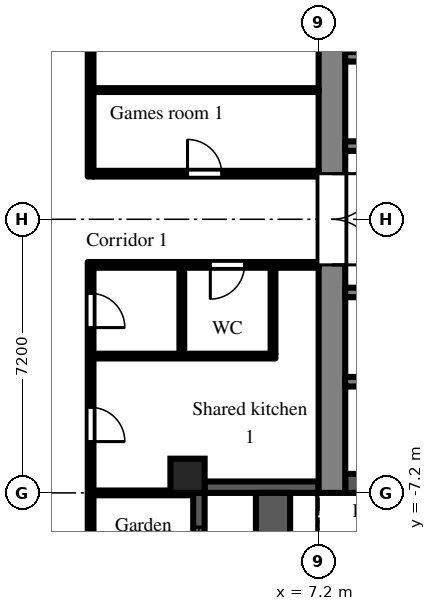
"""IFC4 building model, lengths in metres.
Left out: names, types, materials, properties, quantities, classifications, styles, units other than length and angle.
Written with IfcOpenShell. Run it as: python <this file> out.ifc"""

import sys

from ifc_helpers import new_model, si_unit, direction, frame, frame_2d, origin, origin_2d, place, context, subcontext, project, spatial, rectangle, extrude, element, fill, save


model = new_model("IFC4")
c1 = context("Model", 3, precision=1e-05, world=origin(), true_north=direction((0.0, 1.0)))
c2 = subcontext(c1, "Body", "Model", "MODEL_VIEW")
j1 = project(units=[si_unit("LENGTHUNIT", "METRE"), si_unit("PLANEANGLEUNIT", "RADIAN")], contexts=[c1])
p1 = place(None, origin())
s1 = spatial("IfcSite", under=j1, at=p1, CompositionType="ELEMENT")
p2 = place(p1, origin())
s2 = spatial("IfcBuilding", under=s1, at=p2, CompositionType="ELEMENT")
p3 = place(p2, frame((0.0, 0.0, 102.9)))
s3 = spatial("IfcBuildingStorey", under=s2, at=p3, CompositionType="ELEMENT", Elevation=102.9)
p4 = place(p3, frame((3.75, -6.75, 0.0), z_axis=(0.0, 0.0, 1.0), x_axis=(1.0, 0.0, 0.0)))
e1 = element("IfcColumn", 1, at=p4, inside=s3, PredefinedType="COLUMN", context=c2, shape_type="SweptSolid", body=[
    extrude(rectangle(XDim=0.9, YDim=0.9, at=origin_2d()), origin(), (0.0, 0.0, 1.0), 3.0),
])
p5 = place(p3, frame((4.05, -14.4, 0.0), z_axis=(0.0, 0.0, 1.0), x_axis=(0.0, 1.0, 0.0)))
e2 = element("IfcWall", 2, at=p5, inside=s3, PredefinedType="SOLIDWALL", context=c2, shape_type="SweptSolid", body=[
    extrude(rectangle(XDim=7.2, YDim=0.3, at=frame_2d((3.6, 0.0))), origin(), (0.0, 0.0, 1.0), 2.1),
])
p6 = place(p5, frame((3.0, 0.0, 0.0)))
e3 = element("IfcOpeningElement", 3, at=p6, cuts=e2, PredefinedType="OPENING", context=c2, shape_type="SweptSolid", body=[
    extrude(rectangle(XDim=1.2, YDim=2.05, at=frame_2d((0.6, 1.025))), frame((0.0, 0.16, 0.0), z_axis=(0.0, -1.0, 0.0), x_axis=(1.0, 0.0, 0.0)), (0.0, 0.0, 1.0), 0.32),
])
p7 = place(p5, frame((0.9, 0.0, 0.2)))
e4 = element("IfcOpeningElement", 4, at=p7, cuts=e2, PredefinedType="OPENING", context=c2, shape_type="SweptSolid", body=[
    extrude(rectangle(XDim=1.8, YDim=1.85, at=frame_2d((0.9, 0.925))), frame((0.0, 0.16, 0.0), z_axis=(0.0, -1.0, 0.0), x_axis=(1.0, 0.0, 0.0)), (0.0, 0.0, 1.0), 0.32),
])
p8 = place(p5, frame((4.5, 0.0, 0.2)))
e5 = element("IfcOpeningElement", 5, at=p8, cuts=e2, PredefinedType="OPENING", context=c2, shape_type="SweptSolid", body=[
    extrude(rectangle(XDim=1.8, YDim=1.85, at=frame_2d((0.9, 0.925))), frame((0.0, 0.16, 0.0), z_axis=(0.0, -1.0, 0.0), x_axis=(1.0, 0.0, 0.0)), (0.0, 0.0, 1.0), 0.32),
])
p9 = place(p3, frame((4.2, -7.05, 0.0), z_axis=(0.0, 0.0, 1.0), x_axis=(1.0, 0.0, 0.0)))
e6 = element("IfcWall", 6, at=p9, inside=s3, PredefinedType="SOLIDWALL", context=c2, shape_type="SweptSolid", body=[
    extrude(rectangle(XDim=3.0, YDim=0.3, at=frame_2d((1.5, 0.0))), origin(), (0.0, 0.0, 1.0), 2.1),
])
p10 = place(p3, frame((6.0, -14.4, 0.0), z_axis=(0.0, 0.0, 1.0), x_axis=(0.0, 1.0, 0.0)))
e7 = element("IfcWall", 7, at=p10, inside=s3, PredefinedType="PARAPET", context=c2, shape_type="SweptSolid", body=[
    extrude(rectangle(XDim=7.2, YDim=0.9, at=frame_2d((3.6, 0.0))), origin(), (0.0, 0.0, 1.0), 0.8),
])
p11 = place(p3, frame((7.55, -7.2, 0.0), z_axis=(0.0, 0.0, 1.0), x_axis=(0.0, 1.0, 0.0)))
e8 = element("IfcWall", 8, at=p11, inside=s3, PredefinedType="SHEAR", context=c2, shape_type="SweptSolid", body=[
    extrude(rectangle(XDim=14.4, YDim=0.7, at=frame_2d((7.2, 0.0))), origin(), (0.0, 0.0, 1.0), 2.575),
])
p12 = place(p11, frame((6.0, 0.0, 0.0)))
e9 = element("IfcOpeningElement", 9, at=p12, cuts=e8, PredefinedType="OPENING", context=c2, shape_type="SweptSolid", body=[
    extrude(rectangle(XDim=2.4, YDim=2.2, at=frame_2d((1.2, 1.1))), frame((0.0, 0.36, 0.0), z_axis=(0.0, -1.0, 0.0), x_axis=(1.0, 0.0, 0.0)), (0.0, 0.0, 1.0), 0.72),
])
p13 = place(p3, frame((7.9, 1.925, 0.0), z_axis=(0.0, 0.0, 1.0), x_axis=(1.0, 0.0, 0.0)))
e10 = element("IfcWall", 10, at=p13, inside=s3, PredefinedType="SHEAR", context=c2, shape_type="SweptSolid", body=[
    extrude(rectangle(XDim=12.95, YDim=0.25, at=frame_2d((6.475, 0.0))), origin(), (0.0, 0.0, 1.0), 2.575),
])
p14 = place(p13, frame((0.525, 0.0, 0.0)))
e11 = element("IfcOpeningElement", 11, at=p14, cuts=e10, PredefinedType="OPENING", context=c2, shape_type="SweptSolid", body=[
    extrude(rectangle(XDim=0.9, YDim=2.1, at=frame_2d((0.45, 1.05))), frame((0.0, 0.135, 0.0), z_axis=(0.0, -1.0, 0.0), x_axis=(1.0, 0.0, 0.0)), (0.0, 0.0, 1.0), 0.27),
])
p15 = place(p13, frame((2.625, 0.0, 0.0)))
e12 = element("IfcOpeningElement", 12, at=p15, cuts=e10, PredefinedType="OPENING", context=c2, shape_type="SweptSolid", body=[
    extrude(rectangle(XDim=1.1, YDim=2.1, at=frame_2d((0.55, 1.05))), frame((0.0, 0.135, 0.0), z_axis=(0.0, -1.0, 0.0), x_axis=(1.0, 0.0, 0.0)), (0.0, 0.0, 1.0), 0.27),
])
p16 = place(p13, frame((4.925, 0.0, 0.0)))
e13 = element("IfcOpeningElement", 13, at=p16, cuts=e10, PredefinedType="OPENING", context=c2, shape_type="SweptSolid", body=[
    extrude(rectangle(XDim=0.9, YDim=2.1, at=frame_2d((0.45, 1.05))), frame((0.0, 0.135, 0.0), z_axis=(0.0, -1.0, 0.0), x_axis=(1.0, 0.0, 0.0)), (0.0, 0.0, 1.0), 0.27),
])
p17 = place(p13, frame((8.225, 0.0, 0.0)))
e14 = element("IfcOpeningElement", 14, at=p17, cuts=e10, PredefinedType="OPENING", context=c2, shape_type="SweptSolid", body=[
    extrude(rectangle(XDim=0.9, YDim=2.1, at=frame_2d((0.45, 1.05))), frame((0.0, 0.135, 0.0), z_axis=(0.0, -1.0, 0.0), x_axis=(1.0, 0.0, 0.0)), (0.0, 0.0, 1.0), 0.27),
])
p18 = place(p3, frame((7.9, 4.275, 0.0), z_axis=(0.0, 0.0, 1.0), x_axis=(1.0, 0.0, 0.0)))
e15 = element("IfcWall", 15, at=p18, inside=s3, PredefinedType="SHEAR", context=c2, shape_type="SweptSolid", body=[
    extrude(rectangle(XDim=1.95, YDim=0.25, at=frame_2d((0.975, 0.0))), origin(), (0.0, 0.0, 1.0), 2.575),
])
p19 = place(p3, frame((7.9, -6.95, 0.0), z_axis=(0.0, 0.0, 1.0), x_axis=(1.0, 0.0, 0.0)))
e16 = element("IfcWall", 16, at=p19, inside=s3, PredefinedType="SHEAR", context=c2, shape_type="SweptSolid", body=[
    extrude(rectangle(XDim=12.95, YDim=0.5, at=frame_2d((6.475, 0.0))), origin(), (0.0, 0.0, 1.0), 2.575),
])
p20 = place(p3, frame((7.9, -1.925, 0.0), z_axis=(0.0, 0.0, 1.0), x_axis=(1.0, 0.0, 0.0)))
e17 = element("IfcWall", 17, at=p20, inside=s3, PredefinedType="SHEAR", context=c2, shape_type="SweptSolid", body=[
    extrude(rectangle(XDim=12.95, YDim=0.25, at=frame_2d((6.475, 0.0))), origin(), (0.0, 0.0, 1.0), 2.575),
])
p21 = place(p20, frame((4.825, 0.0, 0.0)))
e18 = element("IfcOpeningElement", 18, at=p21, cuts=e17, PredefinedType="OPENING", context=c2, shape_type="SweptSolid", body=[
    extrude(rectangle(XDim=1.1, YDim=2.1, at=frame_2d((0.55, 1.05))), frame((0.0, 0.135, 0.0), z_axis=(0.0, -1.0, 0.0), x_axis=(1.0, 0.0, 0.0)), (0.0, 0.0, 1.0), 0.27),
])
p22 = place(p20, frame((7.025, 0.0, 0.0)))
e19 = element("IfcOpeningElement", 19, at=p22, cuts=e17, PredefinedType="OPENING", context=c2, shape_type="SweptSolid", body=[
    extrude(rectangle(XDim=1.1, YDim=2.1, at=frame_2d((0.55, 1.05))), frame((0.0, 0.135, 0.0), z_axis=(0.0, -1.0, 0.0), x_axis=(1.0, 0.0, 0.0)), (0.0, 0.0, 1.0), 0.27),
])
p23 = place(p20, frame((9.225, 0.0, 0.0)))
e20 = element("IfcOpeningElement", 20, at=p23, cuts=e17, PredefinedType="OPENING", context=c2, shape_type="SweptSolid", body=[
    extrude(rectangle(XDim=1.1, YDim=2.1, at=frame_2d((0.55, 1.05))), frame((0.0, 0.135, 0.0), z_axis=(0.0, -1.0, 0.0), x_axis=(1.0, 0.0, 0.0)), (0.0, 0.0, 1.0), 0.27),
])
p24 = place(p20, frame((0.525, 0.0, 0.0)))
e21 = element("IfcOpeningElement", 21, at=p24, cuts=e17, PredefinedType="OPENING", context=c2, shape_type="SweptSolid", body=[
    extrude(rectangle(XDim=0.9, YDim=2.1, at=frame_2d((0.45, 1.05))), frame((0.0, 0.135, 0.0), z_axis=(0.0, -1.0, 0.0), x_axis=(1.0, 0.0, 0.0)), (0.0, 0.0, 1.0), 0.27),
])
p25 = place(p20, frame((2.625, 0.0, 0.0)))
e22 = element("IfcOpeningElement", 22, at=p25, cuts=e17, PredefinedType="OPENING", context=c2, shape_type="SweptSolid", body=[
    extrude(rectangle(XDim=1.1, YDim=2.1, at=frame_2d((0.55, 1.05))), frame((0.0, 0.135, 0.0), z_axis=(0.0, -1.0, 0.0), x_axis=(1.0, 0.0, 0.0)), (0.0, 0.0, 1.0), 0.27),
])
p26 = place(p3, frame((7.9, -4.275, 0.0), z_axis=(0.0, 0.0, 1.0), x_axis=(1.0, 0.0, 0.0)))
e23 = element("IfcWall", 23, at=p26, inside=s3, PredefinedType="SHEAR", context=c2, shape_type="SweptSolid", body=[
    extrude(rectangle(XDim=1.95, YDim=0.25, at=frame_2d((0.975, 0.0))), origin(), (0.0, 0.0, 1.0), 2.575),
])
p27 = place(p3, frame((1.2, -36.5, 0.0), z_axis=(0.0, 0.0, 1.0), x_axis=(0.0, 1.0, 0.0)))
e24 = element("IfcWall", 24, at=p27, inside=s3, PredefinedType="PARTITIONING", context=c2, shape_type="SweptSolid", body=[
    extrude(rectangle(XDim=35.375, YDim=0.15, at=frame_2d((17.688, 0.0))), origin(), (0.0, 0.0, 1.0), 2.575),
])
p28 = place(p27, frame((33.65, 0.0, 0.0)))
e25 = element("IfcOpeningElement", 25, at=p28, cuts=e24, PredefinedType="OPENING", context=c2, shape_type="SweptSolid", body=[
    extrude(rectangle(XDim=0.9, YDim=2.1, at=frame_2d((0.45, 1.05))), frame((0.0, 0.085, 0.0), z_axis=(0.0, -1.0, 0.0), x_axis=(1.0, 0.0, 0.0)), (0.0, 0.0, 1.0), 0.17),
])
p29 = place(p27, frame((30.65, 0.0, 0.0)))
e26 = element("IfcOpeningElement", 26, at=p29, cuts=e24, PredefinedType="OPENING", context=c2, shape_type="SweptSolid", body=[
    extrude(rectangle(XDim=0.9, YDim=2.1, at=frame_2d((0.45, 1.05))), frame((0.0, 0.085, 0.0), z_axis=(0.0, -1.0, 0.0), x_axis=(1.0, 0.0, 0.0)), (0.0, 0.0, 1.0), 0.17),
])
p30 = place(p27, frame((23.45, 0.0, 0.0)))
e27 = element("IfcOpeningElement", 27, at=p30, cuts=e24, PredefinedType="OPENING", context=c2, shape_type="SweptSolid", body=[
    extrude(rectangle(XDim=0.9, YDim=2.1, at=frame_2d((0.45, 1.05))), frame((0.0, 0.085, 0.0), z_axis=(0.0, -1.0, 0.0), x_axis=(1.0, 0.0, 0.0)), (0.0, 0.0, 1.0), 0.17),
])
p31 = place(p27, frame((20.75, 0.0, 0.0)))
e28 = element("IfcOpeningElement", 28, at=p31, cuts=e24, PredefinedType="OPENING", context=c2, shape_type="SweptSolid", body=[
    extrude(rectangle(XDim=0.9, YDim=2.1, at=frame_2d((0.45, 1.05))), frame((0.0, 0.085, 0.0), z_axis=(0.0, -1.0, 0.0), x_axis=(1.0, 0.0, 0.0)), (0.0, 0.0, 1.0), 0.17),
])
p32 = place(p27, frame((18.95, 0.0, 0.0)))
e29 = element("IfcOpeningElement", 29, at=p32, cuts=e24, PredefinedType="OPENING", context=c2, shape_type="SweptSolid", body=[
    extrude(rectangle(XDim=0.9, YDim=2.1, at=frame_2d((0.45, 1.05))), frame((0.0, 0.085, 0.0), z_axis=(0.0, -1.0, 0.0), x_axis=(1.0, 0.0, 0.0)), (0.0, 0.0, 1.0), 0.17),
])
p33 = place(p27, frame((1.55, 0.0, 0.0)))
e30 = element("IfcOpeningElement", 30, at=p33, cuts=e24, PredefinedType="OPENING", context=c2, shape_type="SweptSolid", body=[
    extrude(rectangle(XDim=1.0, YDim=2.1, at=frame_2d((0.5, 1.05))), frame((0.0, 0.085, 0.0), z_axis=(0.0, -1.0, 0.0), x_axis=(1.0, 0.0, 0.0)), (0.0, 0.0, 1.0), 0.17),
])
p34 = place(p3, frame((1.275, -7.2, 0.0), z_axis=(0.0, 0.0, 1.0), x_axis=(1.0, 0.0, 0.0)))
e31 = element("IfcWall", 31, at=p34, inside=s3, PredefinedType="PARTITIONING", context=c2, shape_type="SweptSolid", body=[
    extrude(rectangle(XDim=2.625, YDim=0.125, at=frame_2d((1.312, 0.0))), origin(), (0.0, 0.0, 1.0), 2.575),
])
p35 = place(p3, frame((1.275, -3.6, 0.0), z_axis=(0.0, 0.0, 1.0), x_axis=(1.0, 0.0, 0.0)))
e32 = element("IfcWall", 32, at=p35, inside=s3, PredefinedType="PARTITIONING", context=c2, shape_type="SweptSolid", body=[
    extrude(rectangle(XDim=4.788, YDim=0.125, at=frame_2d((2.394, 0.0))), origin(), (0.0, 0.0, 1.0), 2.575),
])
p36 = place(p3, frame((1.275, -1.2, 0.0), z_axis=(0.0, 0.0, 1.0), x_axis=(1.0, 0.0, 0.0)))
e33 = element("IfcWall", 33, at=p36, inside=s3, PredefinedType="PARTITIONING", context=c2, shape_type="SweptSolid", body=[
    extrude(rectangle(XDim=5.925, YDim=0.15, at=frame_2d((2.962, 0.0))), origin(), (0.0, 0.0, 1.0), 2.575),
])
p37 = place(p36, frame((3.075, 0.0, 0.0)))
e34 = element("IfcOpeningElement", 34, at=p37, cuts=e33, PredefinedType="OPENING", context=c2, shape_type="SweptSolid", body=[
    extrude(rectangle(XDim=0.9, YDim=2.1, at=frame_2d((0.45, 1.05))), frame((0.0, 0.085, 0.0), z_axis=(0.0, -1.0, 0.0), x_axis=(1.0, 0.0, 0.0)), (0.0, 0.0, 1.0), 0.17),
])
p38 = place(p3, frame((1.2, 1.125, 0.0), z_axis=(0.0, 0.0, 1.0), x_axis=(0.0, 1.0, 0.0)))
e35 = element("IfcWall", 35, at=p38, inside=s3, PredefinedType="PARTITIONING", context=c2, shape_type="SweptSolid", body=[
    extrude(rectangle(XDim=16.8, YDim=0.15, at=frame_2d((8.4, 0.0))), origin(), (0.0, 0.0, 1.0), 2.575),
])
p39 = place(p38, frame((3.725, 0.0, 0.0)))
e36 = element("IfcOpeningElement", 36, at=p39, cuts=e35, PredefinedType="OPENING", context=c2, shape_type="SweptSolid", body=[
    extrude(rectangle(XDim=0.9, YDim=2.1, at=frame_2d((0.45, 1.05))), frame((0.0, 0.085, 0.0), z_axis=(0.0, -1.0, 0.0), x_axis=(1.0, 0.0, 0.0)), (0.0, 0.0, 1.0), 0.17),
])
p40 = place(p38, frame((11.425, 0.0, 0.0)))
e37 = element("IfcOpeningElement", 37, at=p40, cuts=e35, PredefinedType="OPENING", context=c2, shape_type="SweptSolid", body=[
    extrude(rectangle(XDim=0.9, YDim=2.1, at=frame_2d((0.45, 1.05))), frame((0.0, 0.085, 0.0), z_axis=(0.0, -1.0, 0.0), x_axis=(1.0, 0.0, 0.0)), (0.0, 0.0, 1.0), 0.17),
])
p41 = place(p38, frame((7.825, 0.0, 0.0)))
e38 = element("IfcOpeningElement", 38, at=p41, cuts=e35, PredefinedType="OPENING", context=c2, shape_type="SweptSolid", body=[
    extrude(rectangle(XDim=0.9, YDim=2.1, at=frame_2d((0.45, 1.05))), frame((0.0, 0.085, 0.0), z_axis=(0.0, -1.0, 0.0), x_axis=(1.0, 0.0, 0.0)), (0.0, 0.0, 1.0), 0.17),
])
p42 = place(p38, frame((13.475, 0.0, 0.0)))
e39 = element("IfcOpeningElement", 39, at=p42, cuts=e35, PredefinedType="OPENING", context=c2, shape_type="SweptSolid", body=[
    extrude(rectangle(XDim=1.0, YDim=2.1, at=frame_2d((0.5, 1.05))), frame((0.0, 0.085, 0.0), z_axis=(0.0, -1.0, 0.0), x_axis=(1.0, 0.0, 0.0)), (0.0, 0.0, 1.0), 0.17),
])
p43 = place(p3, frame((1.275, 1.2, 0.0), z_axis=(0.0, 0.0, 1.0), x_axis=(1.0, 0.0, 0.0)))
e40 = element("IfcWall", 40, at=p43, inside=s3, PredefinedType="PARTITIONING", context=c2, shape_type="SweptSolid", body=[
    extrude(rectangle(XDim=5.925, YDim=0.15, at=frame_2d((2.962, 0.0))), origin(), (0.0, 0.0, 1.0), 2.575),
])
p44 = place(p43, frame((2.475, 0.0, 0.0)))
e41 = element("IfcOpeningElement", 41, at=p44, cuts=e40, PredefinedType="OPENING", context=c2, shape_type="SweptSolid", body=[
    extrude(rectangle(XDim=0.9, YDim=2.1, at=frame_2d((0.45, 1.05))), frame((0.0, 0.085, 0.0), z_axis=(0.0, -1.0, 0.0), x_axis=(1.0, 0.0, 0.0)), (0.0, 0.0, 1.0), 0.17),
])
p45 = place(p3, frame((1.275, 3.4, 0.0), z_axis=(0.0, 0.0, 1.0), x_axis=(1.0, 0.0, 0.0)))
e42 = element("IfcWall", 42, at=p45, inside=s3, PredefinedType="PARTITIONING", context=c2, shape_type="SweptSolid", body=[
    extrude(rectangle(XDim=5.925, YDim=0.1, at=frame_2d((2.962, 0.0))), origin(), (0.0, 0.0, 1.0), 2.575),
])
for number, where, z_axis, x_axis in (
    (43, (3.6, -3.538, 0.0), (0.0, 0.0, 1.0), (0.0, 1.0, 0.0)),
    (44, (6.0, -3.538, 0.0), (0.0, 0.0, 1.0), (0.0, 1.0, 0.0)),
):
    element("IfcWall", number, at=place(p3, frame(where, z_axis=z_axis, x_axis=x_axis)), inside=s3, PredefinedType="PARTITIONING", context=c2, shape_type="SweptSolid", body=[
        extrude(rectangle(XDim=2.263, YDim=0.125, at=frame_2d((1.131, 0.0))), origin(), (0.0, 0.0, 1.0), 2.575),
    ])
p46 = place(p8, origin())
e45 = element("IfcWindow", 45, at=p46, inside=s3, PartitioningType="SINGLE_PANEL", PredefinedType="WINDOW", context=c2, shape_type="SweptSolid", body=[
    extrude(rectangle(XDim=1.8, YDim=1.85, at=frame_2d((0.9, 0.925))), frame((0.0, 0.03, 0.0), z_axis=(0.0, -1.0, 0.0), x_axis=(1.0, 0.0, 0.0)), (0.0, 0.0, 1.0), 0.06),
])
fill(e5, e45)
p47 = place(p12, frame((2.4, 0.0, 0.0), z_axis=(0.0, 0.0, 1.0), x_axis=(-1.0, 0.0, 0.0)))
e46 = element("IfcDoor", 46, at=p47, inside=s3, OperationType="DOUBLE_DOOR_DOUBLE_SWING", PredefinedType="DOOR", context=c2, shape_type="SweptSolid", body=[
    extrude(rectangle(XDim=2.4, YDim=2.2, at=frame_2d((1.2, 1.1))), frame((0.0, 0.025, 0.0), z_axis=(0.0, -1.0, 0.0), x_axis=(1.0, 0.0, 0.0)), (0.0, 0.0, 1.0), 0.05),
])
fill(e9, e46)
p48 = place(p44, origin())
e47 = element("IfcDoor", 47, at=p48, inside=s3, OperationType="SINGLE_SWING_LEFT", PredefinedType="DOOR", context=c2, shape_type="SweptSolid", body=[
    extrude(rectangle(XDim=0.9, YDim=2.1, at=frame_2d((0.45, 1.05))), frame((0.0, 0.025, 0.0), z_axis=(0.0, -1.0, 0.0), x_axis=(1.0, 0.0, 0.0)), (0.0, 0.0, 1.0), 0.05),
])
fill(e41, e47)
p49 = place(p28, frame((0.9, 0.0, 0.0), z_axis=(0.0, 0.0, 1.0), x_axis=(-1.0, 0.0, 0.0)))
e48 = element("IfcDoor", 48, at=p49, inside=s3, OperationType="SINGLE_SWING_RIGHT", PredefinedType="DOOR", context=c2, shape_type="SweptSolid", body=[
    extrude(rectangle(XDim=0.9, YDim=2.1, at=frame_2d((0.45, 1.05))), frame((0.0, 0.025, 0.0), z_axis=(0.0, -1.0, 0.0), x_axis=(1.0, 0.0, 0.0)), (0.0, 0.0, 1.0), 0.05),
])
fill(e25, e48)
p50 = place(p37, frame((0.9, 0.0, 0.0), z_axis=(0.0, 0.0, 1.0), x_axis=(-1.0, 0.0, 0.0)))
e49 = element("IfcDoor", 49, at=p50, inside=s3, OperationType="SINGLE_SWING_RIGHT", PredefinedType="DOOR", context=c2, shape_type="SweptSolid", body=[
    extrude(rectangle(XDim=0.9, YDim=2.1, at=frame_2d((0.45, 1.05))), frame((0.0, 0.025, 0.0), z_axis=(0.0, -1.0, 0.0), x_axis=(1.0, 0.0, 0.0)), (0.0, 0.0, 1.0), 0.05),
])
fill(e34, e49)
p51 = place(p29, frame((0.9, 0.0, 0.0), z_axis=(0.0, 0.0, 1.0), x_axis=(-1.0, 0.0, 0.0)))
e50 = element("IfcDoor", 50, at=p51, inside=s3, OperationType="SINGLE_SWING_RIGHT", PredefinedType="DOOR", context=c2, shape_type="SweptSolid", body=[
    extrude(rectangle(XDim=0.9, YDim=2.1, at=frame_2d((0.45, 1.05))), frame((0.0, 0.025, 0.0), z_axis=(0.0, -1.0, 0.0), x_axis=(1.0, 0.0, 0.0)), (0.0, 0.0, 1.0), 0.05),
])
fill(e26, e50)
save(model, sys.argv[1])
